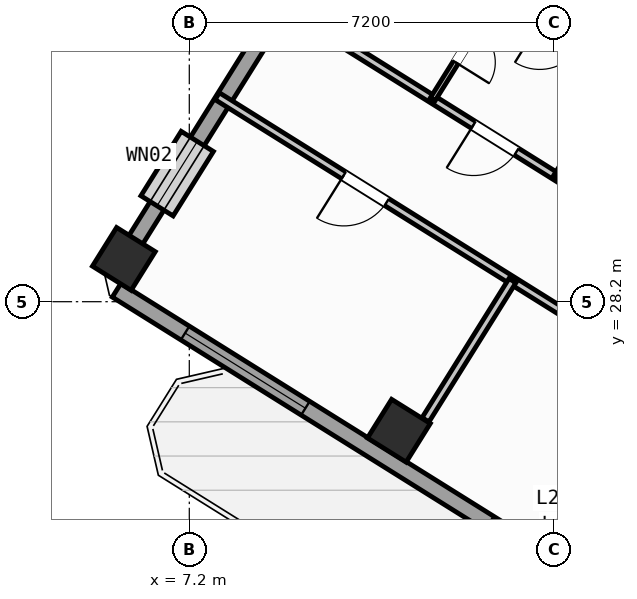
"""IFC4 building model, lengths in metres.
Left out: names, types, materials, properties, quantities, classifications, styles, units other than length and angle.
Written with IfcOpenShell. Run it as: python <this file> out.ifc"""

import sys

from ifc_helpers import new_model, si_unit, direction, frame, frame_2d, origin, origin_2d, place, context, subcontext, project, spatial, rectangle, hollow_rectangle, extrude, source, transform, mapped, element, fill, save


model = new_model("IFC4")
c1 = context("Model", 3, precision=1e-05, world=origin(), true_north=direction((0.0, 1.0)))
c2 = subcontext(c1, "Body", "Model", "MODEL_VIEW")
j1 = project(units=[si_unit("LENGTHUNIT", "METRE"), si_unit("PLANEANGLEUNIT", "RADIAN")], contexts=[c1])
p1 = place(None, origin())
s1 = spatial("IfcSite", under=j1, at=p1, CompositionType="ELEMENT")
p2 = place(p1, origin())
s2 = spatial("IfcBuilding", under=s1, at=p2, CompositionType="ELEMENT")
p3 = place(p2, frame((0.0, 0.0, 100.8)))
s3 = spatial("IfcBuildingStorey", under=s2, at=p3, CompositionType="ELEMENT", Elevation=100.8)
m1 = source(origin(), c2, "Body", "SweptSolid", [
    extrude(hollow_rectangle(XDim=0.9, YDim=0.9, WallThickness=0.036, at=origin_2d()), origin(), (0.0, 0.0, 1.0), 4.5),
])
for number, where, z_axis, x_axis in (
    (1, (11.336, 25.653, 0.0), (0.0, 0.0, 1.0), (-0.848, 0.53, 0.0)),
    (2, (5.909, 29.044, 0.0), (0.0, 0.0, 1.0), (-0.848, 0.53, 0.0)),
):
    element("IfcColumn", number, at=place(p3, frame(where, z_axis=z_axis, x_axis=x_axis)), inside=s3, PredefinedType="COLUMN", context=c2, shape_type="MappedRepresentation", body=[
        mapped(m1, transform((0.0, 0.0, 0.0), scale=1.0)),
    ])
p4 = place(p3, frame((31.76, 12.183, 0.0), z_axis=(0.0, 0.0, 1.0), x_axis=(-0.848047074256, 0.529920899612, 0.0)))
e3 = element("IfcWall", 3, at=p4, inside=s3, PredefinedType="STANDARD", context=c2, shape_type="SweptSolid", body=[
    extrude(rectangle(XDim=30.652, YDim=0.32, at=frame_2d((15.326, 0.0))), origin(), (0.0, 0.0, 1.0), 4.25),
])
p5 = place(p4, frame((15.153, 0.0, 0.0)))
e4 = element("IfcOpeningElement", 4, at=p5, cuts=e3, PredefinedType="OPENING", context=c2, shape_type="SweptSolid", body=[
    extrude(rectangle(XDim=1.2, YDim=2.15, at=frame_2d((0.6, 1.075))), frame((0.0, 0.17, 0.0), z_axis=(0.0, -1.0, 0.0), x_axis=(1.0, 0.0, 0.0)), (0.0, 0.0, 1.0), 0.34),
])
p6 = place(p4, frame((1.652, 0.0, 0.65)))
e5 = element("IfcOpeningElement", 5, at=p6, cuts=e3, PredefinedType="OPENING", context=c2, shape_type="SweptSolid", body=[
    extrude(rectangle(XDim=2.8, YDim=2.1, at=frame_2d((1.4, 1.05))), frame((0.0, 0.17, 0.0), z_axis=(0.0, -1.0, 0.0), x_axis=(1.0, 0.0, 0.0)), (0.0, 0.0, 1.0), 0.34),
])
p7 = place(p4, frame((6.856, 0.0, 0.65)))
e6 = element("IfcOpeningElement", 6, at=p7, cuts=e3, PredefinedType="OPENING", context=c2, shape_type="SweptSolid", body=[
    extrude(rectangle(XDim=2.8, YDim=2.1, at=frame_2d((1.4, 1.05))), frame((0.0, 0.17, 0.0), z_axis=(0.0, -1.0, 0.0), x_axis=(1.0, 0.0, 0.0)), (0.0, 0.0, 1.0), 0.34),
])
p8 = place(p4, frame((20.478, 0.0, 0.85)))
e7 = element("IfcOpeningElement", 7, at=p8, cuts=e3, PredefinedType="OPENING", context=c2, shape_type="SweptSolid", body=[
    extrude(rectangle(XDim=1.5, YDim=1.5, at=frame_2d((0.75, 0.75))), frame((0.0, 0.17, 0.0), z_axis=(0.0, -1.0, 0.0), x_axis=(1.0, 0.0, 0.0)), (0.0, 0.0, 1.0), 0.34),
])
p9 = place(p4, frame((26.258, 0.0, 0.65)))
e8 = element("IfcOpeningElement", 8, at=p9, cuts=e3, PredefinedType="OPENING", context=c2, shape_type="SweptSolid", body=[
    extrude(rectangle(XDim=2.8, YDim=2.1, at=frame_2d((1.4, 1.05))), frame((0.0, 0.17, 0.0), z_axis=(0.0, -1.0, 0.0), x_axis=(1.0, 0.0, 0.0)), (0.0, 0.0, 1.0), 0.34),
])
p10 = place(p3, frame((5.7, 28.71, 0.0), z_axis=(0.0, 0.0, 1.0), x_axis=(0.529923711467, 0.8480453172, 0.0)))
e9 = element("IfcWall", 9, at=p10, inside=s3, PredefinedType="STANDARD", context=c2, shape_type="SweptSolid", body=[
    extrude(rectangle(XDim=21.587, YDim=0.32, at=frame_2d((10.794, 0.0))), origin(), (0.0, 0.0, 1.0), 3.675),
])
p11 = place(p10, frame((1.629, 0.0, 0.85)))
e10 = element("IfcOpeningElement", 10, at=p11, cuts=e9, PredefinedType="OPENING", context=c2, shape_type="SweptSolid", body=[
    extrude(rectangle(XDim=1.5, YDim=1.5, at=frame_2d((0.75, 0.75))), frame((0.0, 0.17, 0.0), z_axis=(0.0, -1.0, 0.0), x_axis=(1.0, 0.0, 0.0)), (0.0, 0.0, 1.0), 0.34),
])
p12 = place(p10, frame((10.654, 0.0, 0.8)))
e11 = element("IfcOpeningElement", 11, at=p12, cuts=e9, PredefinedType="OPENING", context=c2, shape_type="SweptSolid", body=[
    extrude(rectangle(XDim=2.1, YDim=1.55, at=frame_2d((1.05, 0.775))), frame((0.0, 0.17, 0.0), z_axis=(0.0, -1.0, 0.0), x_axis=(1.0, 0.0, 0.0)), (0.0, 0.0, 1.0), 0.34),
])
p13 = place(p10, frame((17.803, 0.0, 0.85)))
e12 = element("IfcOpeningElement", 12, at=p13, cuts=e9, PredefinedType="OPENING", context=c2, shape_type="SweptSolid", body=[
    extrude(rectangle(XDim=1.5, YDim=1.5, at=frame_2d((0.75, 0.75))), frame((0.0, 0.17, 0.0), z_axis=(0.0, -1.0, 0.0), x_axis=(1.0, 0.0, 0.0)), (0.0, 0.0, 1.0), 0.34),
])
p14 = place(p3, frame((23.104, 25.256, 0.0), z_axis=(0.0, 0.0, 1.0), x_axis=(-0.848041752158, 0.529929416617, 0.0)))
e13 = element("IfcWall", 13, at=p14, inside=s3, PredefinedType="PARTITIONING", context=c2, shape_type="SweptSolid", body=[
    extrude(rectangle(XDim=16.73, YDim=0.16, at=frame_2d((8.365, 0.0))), origin(), (0.0, 0.0, 1.0), 4.24),
])
p15 = place(p14, frame((1.395, 0.0, 0.0)))
e14 = element("IfcOpeningElement", 14, at=p15, cuts=e13, PredefinedType="OPENING", context=c2, shape_type="SweptSolid", body=[
    extrude(rectangle(XDim=1.0, YDim=2.1, at=frame_2d((0.5, 1.05))), frame((0.0, 0.09, 0.0), z_axis=(0.0, -1.0, 0.0), x_axis=(1.0, 0.0, 0.0)), (0.0, 0.0, 1.0), 0.18),
])
p16 = place(p14, frame((7.82, 0.0, 0.0)))
e15 = element("IfcOpeningElement", 15, at=p16, cuts=e13, PredefinedType="OPENING", context=c2, shape_type="SweptSolid", body=[
    extrude(rectangle(XDim=1.0, YDim=2.1, at=frame_2d((0.5, 1.05))), frame((0.0, 0.09, 0.0), z_axis=(0.0, -1.0, 0.0), x_axis=(1.0, 0.0, 0.0)), (0.0, 0.0, 1.0), 0.18),
])
p17 = place(p14, frame((11.14, 0.0, 0.0)))
e16 = element("IfcOpeningElement", 16, at=p17, cuts=e13, PredefinedType="OPENING", context=c2, shape_type="SweptSolid", body=[
    extrude(rectangle(XDim=1.0, YDim=2.1, at=frame_2d((0.5, 1.05))), frame((0.0, 0.09, 0.0), z_axis=(0.0, -1.0, 0.0), x_axis=(1.0, 0.0, 0.0)), (0.0, 0.0, 1.0), 0.18),
])
p18 = place(p3, frame((21.938, 23.391, 0.0), z_axis=(0.0, 0.0, 1.0), x_axis=(-0.848045850158, 0.529922858565, 0.0)))
e17 = element("IfcWall", 17, at=p18, inside=s3, PredefinedType="PARTITIONING", context=c2, shape_type="SweptSolid", body=[
    extrude(rectangle(XDim=16.73, YDim=0.16, at=frame_2d((8.365, 0.0))), origin(), (0.0, 0.0, 1.0), 4.24),
])
p19 = place(p18, frame((1.505, 0.0, 0.0)))
e18 = element("IfcOpeningElement", 18, at=p19, cuts=e17, PredefinedType="OPENING", context=c2, shape_type="SweptSolid", body=[
    extrude(rectangle(XDim=1.0, YDim=2.1, at=frame_2d((0.5, 1.05))), frame((0.0, 0.09, 0.0), z_axis=(0.0, -1.0, 0.0), x_axis=(1.0, 0.0, 0.0)), (0.0, 0.0, 1.0), 0.18),
])
p20 = place(p18, frame((6.435, 0.0, 0.0)))
e19 = element("IfcOpeningElement", 19, at=p20, cuts=e17, PredefinedType="OPENING", context=c2, shape_type="SweptSolid", body=[
    extrude(rectangle(XDim=1.0, YDim=2.1, at=frame_2d((0.5, 1.05))), frame((0.0, 0.09, 0.0), z_axis=(0.0, -1.0, 0.0), x_axis=(1.0, 0.0, 0.0)), (0.0, 0.0, 1.0), 0.18),
])
p21 = place(p18, frame((12.784, 0.0, 0.0)))
e20 = element("IfcOpeningElement", 20, at=p21, cuts=e17, PredefinedType="OPENING", context=c2, shape_type="SweptSolid", body=[
    extrude(rectangle(XDim=1.0, YDim=2.1, at=frame_2d((0.5, 1.05))), frame((0.0, 0.09, 0.0), z_axis=(0.0, -1.0, 0.0), x_axis=(1.0, 0.0, 0.0)), (0.0, 0.0, 1.0), 0.18),
])
p22 = place(p3, frame((13.577, 28.615, 0.0), z_axis=(0.0, 0.0, 1.0), x_axis=(-0.529890499457, -0.848066069705, 0.0)))
e21 = element("IfcWall", 21, at=p22, inside=s3, PredefinedType="PARTITIONING", context=c2, shape_type="SweptSolid", body=[
    extrude(rectangle(XDim=3.238, YDim=0.16, at=frame_2d((1.619, 0.0))), origin(), (0.0, 0.0, 1.0), 4.24),
])
p23 = place(p3, frame((14.96, 31.452, 0.0), z_axis=(0.0, 0.0, 1.0), x_axis=(-0.529952145338, -0.848027548876, 0.0)))
e22 = element("IfcWall", 22, at=p23, inside=s3, PredefinedType="PARTITIONING", context=c2, shape_type="SweptSolid", body=[
    extrude(rectangle(XDim=0.938, YDim=0.16, at=frame_2d((0.469, 0.0))), origin(), (0.0, 0.0, 1.0), 3.675),
])
p24 = place(p3, frame((20.281, 45.44, 0.0), z_axis=(0.0, 0.0, 1.0), x_axis=(-0.529917451133, -0.848049229105, 0.0)))
e23 = element("IfcWall", 23, at=p24, inside=s3, PredefinedType="PARTITIONING", context=c2, shape_type="SweptSolid", body=[
    extrude(rectangle(XDim=15.62, YDim=0.11, at=frame_2d((7.81, 0.0))), origin(), (0.0, 0.0, 1.0), 4.24),
])
p25 = place(p24, frame((13.98, 0.0, 0.0)))
e24 = element("IfcOpeningElement", 24, at=p25, cuts=e23, PredefinedType="OPENING", context=c2, shape_type="SweptSolid", body=[
    extrude(rectangle(XDim=0.78, YDim=2.05, at=frame_2d((0.39, 1.025))), frame((0.0, 0.065, 0.0), z_axis=(0.0, -1.0, 0.0), x_axis=(1.0, 0.0, 0.0)), (0.0, 0.0, 1.0), 0.13),
])
p26 = place(p24, frame((9.055, 0.0, 0.0)))
e25 = element("IfcOpeningElement", 25, at=p26, cuts=e23, PredefinedType="OPENING", context=c2, shape_type="SweptSolid", body=[
    extrude(rectangle(XDim=0.92, YDim=2.08, at=frame_2d((0.46, 1.04))), frame((0.0, 0.065, 0.0), z_axis=(0.0, -1.0, 0.0), x_axis=(1.0, 0.0, 0.0)), (0.0, 0.0, 1.0), 0.13),
])
p27 = place(p3, frame((15.734, 32.692, 0.0), z_axis=(0.0, 0.0, 1.0), x_axis=(-0.848059786386, 0.529900555496, 0.0)))
e26 = element("IfcWall", 26, at=p27, inside=s3, PredefinedType="PLUMBINGWALL", context=c2, shape_type="SweptSolid", body=[
    extrude(rectangle(XDim=2.9, YDim=0.14, at=frame_2d((1.45, 0.0))), origin(), (0.0, 0.0, 1.0), 4.24),
])
p28 = place(p27, frame((0.99, 0.0, 0.0)))
e27 = element("IfcOpeningElement", 27, at=p28, cuts=e26, PredefinedType="OPENING", context=c2, shape_type="SweptSolid", body=[
    extrude(rectangle(XDim=0.92, YDim=2.08, at=frame_2d((0.46, 1.04))), frame((0.0, 0.08, 0.0), z_axis=(0.0, -1.0, 0.0), x_axis=(1.0, 0.0, 0.0)), (0.0, 0.0, 1.0), 0.16),
])
m2 = source(origin(), c2, "Body", "SweptSolid", [
    extrude(rectangle(XDim=2.8, YDim=2.1, at=frame_2d((1.4, 1.05))), frame((0.0, 0.03, 0.0), z_axis=(0.0, -1.0, 0.0), x_axis=(1.0, 0.0, 0.0)), (0.0, 0.0, 1.0), 0.06),
])
p29 = place(p9, origin())
e28 = element("IfcWindow", 28, at=p29, inside=s3, PartitioningType="SINGLE_PANEL", PredefinedType="WINDOW", context=c2, shape_type="MappedRepresentation", body=[
    mapped(m2, transform((0.0, 0.0, 0.0), scale=1.0)),
])
fill(e8, e28)
m3 = source(origin(), c2, "Body", "SweptSolid", [
    extrude(rectangle(XDim=1.5, YDim=1.5, at=frame_2d((0.75, 0.75))), frame((0.0, 0.03, 0.0), z_axis=(0.0, -1.0, 0.0), x_axis=(1.0, 0.0, 0.0)), (0.0, 0.0, 1.0), 0.06),
])
p30 = place(p11, origin())
e29 = element("IfcWindow", 29, at=p30, inside=s3, PartitioningType="SINGLE_PANEL", PredefinedType="WINDOW", context=c2, shape_type="MappedRepresentation", body=[
    mapped(m3, transform((0.0, 0.0, 0.0), scale=1.0)),
])
fill(e10, e29)
m4 = source(origin(), c2, "Body", "SweptSolid", [
    extrude(rectangle(XDim=1.0, YDim=2.1, at=frame_2d((0.5, 1.05))), frame((0.0, 0.025, 0.0), z_axis=(0.0, -1.0, 0.0), x_axis=(1.0, 0.0, 0.0)), (0.0, 0.0, 1.0), 0.05),
])
p31 = place(p21, origin())
e30 = element("IfcDoor", 30, at=p31, inside=s3, OperationType="SINGLE_SWING_RIGHT", PredefinedType="DOOR", context=c2, shape_type="MappedRepresentation", body=[
    mapped(m4, transform((0.0, 0.0, 0.0), scale=1.0)),
])
fill(e20, e30)
p32 = place(p17, origin())
e31 = element("IfcDoor", 31, at=p32, inside=s3, OperationType="SINGLE_SWING_RIGHT", PredefinedType="DOOR", context=c2, shape_type="MappedRepresentation", body=[
    mapped(m4, transform((0.0, 0.0, 0.0), scale=1.0)),
])
fill(e16, e31)
m5 = source(origin(), c2, "Body", "SweptSolid", [
    extrude(rectangle(XDim=0.78, YDim=2.05, at=frame_2d((0.39, 1.025))), frame((0.0, 0.025, 0.0), z_axis=(0.0, -1.0, 0.0), x_axis=(1.0, 0.0, 0.0)), (0.0, 0.0, 1.0), 0.05),
])
p33 = place(p25, origin())
e32 = element("IfcDoor", 32, at=p33, inside=s3, OperationType="SINGLE_SWING_RIGHT", PredefinedType="DOOR", context=c2, shape_type="MappedRepresentation", body=[
    mapped(m5, transform((0.0, 0.0, 0.0), scale=1.0)),
])
fill(e24, e32)
save(model, sys.argv[1])
